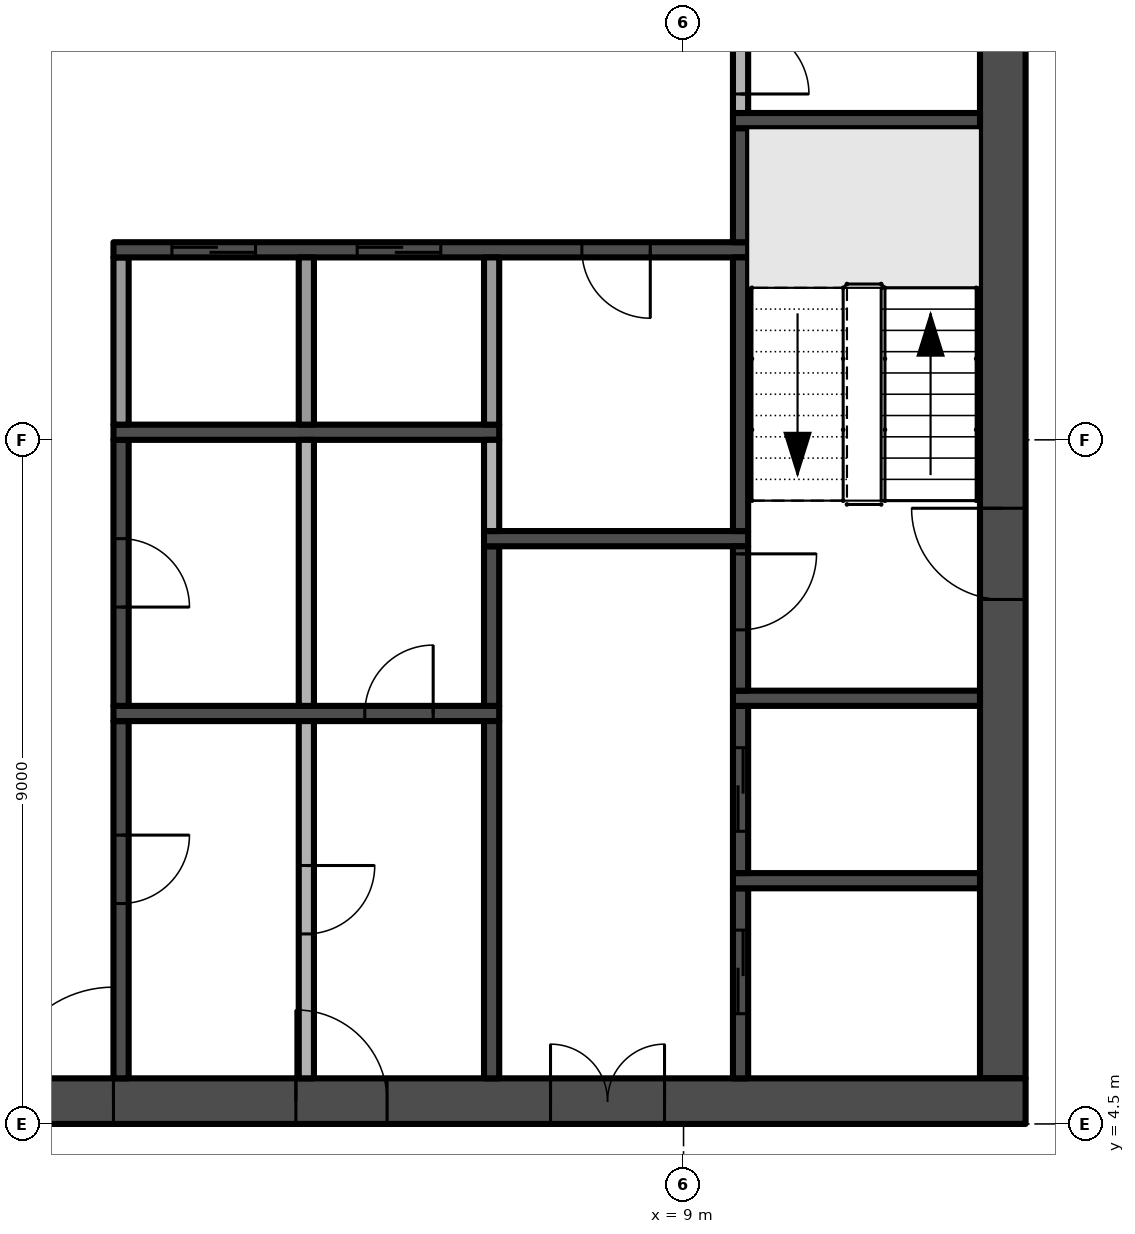
"""IFC4 building model, lengths in metres.
Left out: names, types, materials, properties, quantities, classifications, styles, units other than length and angle.
Written with IfcOpenShell. Run it as: python <this file> out.ifc"""

import sys

from ifc_helpers import new_model, si_unit, direction, frame, frame_2d, origin, place, context, subcontext, project, spatial, rectangle, extrude, element, fill, save


model = new_model("IFC4")
c1 = context("Model", 3, precision=1e-05, world=origin(), true_north=direction((0.0, 1.0)))
c2 = subcontext(c1, "Body", "Model", "MODEL_VIEW")
j1 = project(units=[si_unit("LENGTHUNIT", "METRE"), si_unit("PLANEANGLEUNIT", "RADIAN")], contexts=[c1])
p1 = place(None, origin())
s1 = spatial("IfcSite", under=j1, at=p1, CompositionType="ELEMENT")
p2 = place(p1, origin())
s2 = spatial("IfcBuilding", under=s1, at=p2, CompositionType="ELEMENT")
p3 = place(p2, frame((0.0, 0.0, 254.0)))
s3 = spatial("IfcBuildingStorey", under=s2, at=p3, CompositionType="ELEMENT", Elevation=254.0)
p4 = place(p3, frame((-13.5, 4.8, -0.3), z_axis=(0.0, 0.0, 1.0), x_axis=(1.0, 0.0, 0.0)))
e1 = element("IfcWall", 1, at=p4, inside=s3, PredefinedType="SHEAR", context=c2, shape_type="SweptSolid", body=[
    extrude(rectangle(XDim=27.0, YDim=0.6, at=frame_2d((13.5, 0.0))), origin(), (0.0, 0.0, 1.0), 3.8),
])
p5 = place(p4, frame((12.0, 0.0, 0.3)))
e2 = element("IfcOpeningElement", 2, at=p5, cuts=e1, PredefinedType="OPENING", context=c2, shape_type="SweptSolid", body=[
    extrude(rectangle(XDim=3.0, YDim=2.4, at=frame_2d((1.5, 1.2))), frame((0.0, 0.31, 0.0), z_axis=(0.0, -1.0, 0.0), x_axis=(1.0, 0.0, 0.0)), (0.0, 0.0, 1.0), 0.62),
])
p6 = place(p4, frame((4.9, 0.0, 0.3)))
e3 = element("IfcOpeningElement", 3, at=p6, cuts=e1, PredefinedType="OPENING", context=c2, shape_type="SweptSolid", body=[
    extrude(rectangle(XDim=1.2, YDim=2.2, at=frame_2d((0.6, 1.1))), frame((0.0, 0.31, 0.0), z_axis=(0.0, -1.0, 0.0), x_axis=(1.0, 0.0, 0.0)), (0.0, 0.0, 1.0), 0.62),
])
p7 = place(p4, frame((20.75, 0.0, 0.3)))
e4 = element("IfcOpeningElement", 4, at=p7, cuts=e1, PredefinedType="OPENING", context=c2, shape_type="SweptSolid", body=[
    extrude(rectangle(XDim=1.5, YDim=2.2, at=frame_2d((0.75, 1.1))), frame((0.0, 0.31, 0.0), z_axis=(0.0, -1.0, 0.0), x_axis=(1.0, 0.0, 0.0)), (0.0, 0.0, 1.0), 0.62),
])
p8 = place(p4, frame((17.4, 0.0, 0.3)))
e5 = element("IfcOpeningElement", 5, at=p8, cuts=e1, PredefinedType="OPENING", context=c2, shape_type="SweptSolid", body=[
    extrude(rectangle(XDim=1.2, YDim=2.2, at=frame_2d((0.6, 1.1))), frame((0.0, 0.31, 0.0), z_axis=(0.0, -1.0, 0.0), x_axis=(1.0, 0.0, 0.0)), (0.0, 0.0, 1.0), 0.62),
])
p9 = place(p3, frame((13.2, 5.1, -0.3), z_axis=(0.0, 0.0, 1.0), x_axis=(0.0, 1.0, 0.0)))
e6 = element("IfcWall", 6, at=p9, inside=s3, PredefinedType="SHEAR", context=c2, shape_type="SweptSolid", body=[
    extrude(rectangle(XDim=16.8, YDim=0.6, at=frame_2d((8.4, 0.0))), origin(), (0.0, 0.0, 1.0), 3.8),
])
p10 = place(p9, frame((6.3, 0.0, 0.3)))
e7 = element("IfcOpeningElement", 7, at=p10, cuts=e6, PredefinedType="OPENING", context=c2, shape_type="SweptSolid", body=[
    extrude(rectangle(XDim=1.2, YDim=2.2, at=frame_2d((0.6, 1.1))), frame((0.0, 0.31, 0.0), z_axis=(0.0, -1.0, 0.0), x_axis=(1.0, 0.0, 0.0)), (0.0, 0.0, 1.0), 0.62),
])
p11 = place(p3, frame((1.6, 9.8, 0.0), z_axis=(0.0, 0.0, 1.0), x_axis=(0.0, -1.0, 0.0)))
e8 = element("IfcWall", 8, at=p11, inside=s3, PredefinedType="SHEAR", context=c2, shape_type="SweptSolid", body=[
    extrude(rectangle(XDim=4.7, YDim=0.2, at=frame_2d((2.35, 0.0))), origin(), (0.0, 0.0, 1.0), 3.5),
])
p12 = place(p11, frame((1.5, 0.0, 0.0)))
e9 = element("IfcOpeningElement", 9, at=p12, cuts=e8, PredefinedType="OPENING", context=c2, shape_type="SweptSolid", body=[
    extrude(rectangle(XDim=0.9, YDim=2.1, at=frame_2d((0.45, 1.05))), frame((0.0, 0.11, 0.0), z_axis=(0.0, -1.0, 0.0), x_axis=(1.0, 0.0, 0.0)), (0.0, 0.0, 1.0), 0.22),
])
p13 = place(p3, frame((1.5, 9.9, 0.0), z_axis=(0.0, 0.0, 1.0), x_axis=(1.0, 0.0, 0.0)))
e10 = element("IfcWall", 10, at=p13, inside=s3, PredefinedType="SHEAR", context=c2, shape_type="SweptSolid", body=[
    extrude(rectangle(XDim=5.075, YDim=0.2, at=frame_2d((2.538, 0.0))), origin(), (0.0, 0.0, 1.0), 3.5),
])
p14 = place(p13, frame((3.306, 0.0, 0.0)))
e11 = element("IfcOpeningElement", 11, at=p14, cuts=e10, PredefinedType="OPENING", context=c2, shape_type="SweptSolid", body=[
    extrude(rectangle(XDim=0.9, YDim=2.1, at=frame_2d((0.45, 1.05))), frame((0.0, 0.11, 0.0), z_axis=(0.0, -1.0, 0.0), x_axis=(1.0, 0.0, 0.0)), (0.0, 0.0, 1.0), 0.22),
])
p15 = place(p3, frame((1.6, 13.5, 0.0), z_axis=(0.0, 0.0, 1.0), x_axis=(0.0, -1.0, 0.0)))
e12 = element("IfcWall", 12, at=p15, inside=s3, PredefinedType="SHEAR", context=c2, shape_type="SweptSolid", body=[
    extrude(rectangle(XDim=3.5, YDim=0.2, at=frame_2d((1.75, 0.0))), origin(), (0.0, 0.0, 1.0), 3.5),
])
p16 = place(p15, frame((1.3, 0.0, 0.0)))
e13 = element("IfcOpeningElement", 13, at=p16, cuts=e12, PredefinedType="OPENING", context=c2, shape_type="SweptSolid", body=[
    extrude(rectangle(XDim=0.9, YDim=2.1, at=frame_2d((0.45, 1.05))), frame((0.0, 0.11, 0.0), z_axis=(0.0, -1.0, 0.0), x_axis=(1.0, 0.0, 0.0)), (0.0, 0.0, 1.0), 0.22),
])
p17 = place(p3, frame((1.5, 13.6, 0.0), z_axis=(0.0, 0.0, 1.0), x_axis=(1.0, 0.0, 0.0)))
e14 = element("IfcWall", 14, at=p17, inside=s3, PredefinedType="SHEAR", context=c2, shape_type="SweptSolid", body=[
    extrude(rectangle(XDim=5.075, YDim=0.2, at=frame_2d((2.538, 0.0))), origin(), (0.0, 0.0, 1.0), 3.5),
])
p18 = place(p3, frame((1.6, 13.7, 0.0), z_axis=(0.0, 0.0, 1.0), x_axis=(0.0, 1.0, 0.0)))
e15 = element("IfcWall", 15, at=p18, inside=s3, PredefinedType="PARTITIONING", context=c2, shape_type="SweptSolid", body=[
    extrude(rectangle(XDim=2.2, YDim=0.2, at=frame_2d((1.1, 0.0))), origin(), (0.0, 0.0, 1.0), 3.5),
])
p19 = place(p3, frame((9.85, 16.0, 0.0), z_axis=(0.0, 0.0, 1.0), x_axis=(-1.0, 0.0, 0.0)))
e16 = element("IfcWall", 16, at=p19, inside=s3, PredefinedType="SHEAR", context=c2, shape_type="SweptSolid", body=[
    extrude(rectangle(XDim=8.35, YDim=0.2, at=frame_2d((4.175, 0.0))), origin(), (0.0, 0.0, 1.0), 3.5),
])
p20 = place(p19, frame((6.481, 0.0, 0.0)))
e17 = element("IfcOpeningElement", 17, at=p20, cuts=e16, PredefinedType="OPENING", context=c2, shape_type="SweptSolid", body=[
    extrude(rectangle(XDim=1.1, YDim=2.1, at=frame_2d((0.55, 1.05))), frame((0.0, 0.11, 0.0), z_axis=(0.0, -1.0, 0.0), x_axis=(1.0, 0.0, 0.0)), (0.0, 0.0, 1.0), 0.22),
])
p21 = place(p19, frame((4.044, 0.0, 0.0)))
e18 = element("IfcOpeningElement", 18, at=p21, cuts=e16, PredefinedType="OPENING", context=c2, shape_type="SweptSolid", body=[
    extrude(rectangle(XDim=1.1, YDim=2.1, at=frame_2d((0.55, 1.05))), frame((0.0, 0.11, 0.0), z_axis=(0.0, -1.0, 0.0), x_axis=(1.0, 0.0, 0.0)), (0.0, 0.0, 1.0), 0.22),
])
p22 = place(p19, frame((1.288, 0.0, 0.0)))
e19 = element("IfcOpeningElement", 19, at=p22, cuts=e16, PredefinedType="OPENING", context=c2, shape_type="SweptSolid", body=[
    extrude(rectangle(XDim=0.9, YDim=2.1, at=frame_2d((0.45, 1.05))), frame((0.0, 0.11, 0.0), z_axis=(0.0, -1.0, 0.0), x_axis=(1.0, 0.0, 0.0)), (0.0, 0.0, 1.0), 0.22),
])
p23 = place(p3, frame((4.037, 9.8, 0.0), z_axis=(0.0, 0.0, 1.0), x_axis=(0.0, -1.0, 0.0)))
e20 = element("IfcWall", 20, at=p23, inside=s3, PredefinedType="PARTITIONING", context=c2, shape_type="SweptSolid", body=[
    extrude(rectangle(XDim=4.7, YDim=0.2, at=frame_2d((2.35, 0.0))), origin(), (0.0, 0.0, 1.0), 3.5),
])
p24 = place(p23, frame((1.9, 0.0, 0.0)))
e21 = element("IfcOpeningElement", 21, at=p24, cuts=e20, PredefinedType="OPENING", context=c2, shape_type="SweptSolid", body=[
    extrude(rectangle(XDim=0.9, YDim=2.1, at=frame_2d((0.45, 1.05))), frame((0.0, 0.11, 0.0), z_axis=(0.0, -1.0, 0.0), x_axis=(1.0, 0.0, 0.0)), (0.0, 0.0, 1.0), 0.22),
])
p25 = place(p3, frame((4.037, 10.0, 0.0), z_axis=(0.0, 0.0, 1.0), x_axis=(0.0, 1.0, 0.0)))
e22 = element("IfcWall", 22, at=p25, inside=s3, PredefinedType="PARTITIONING", context=c2, shape_type="SweptSolid", body=[
    extrude(rectangle(XDim=3.5, YDim=0.2, at=frame_2d((1.75, 0.0))), origin(), (0.0, 0.0, 1.0), 3.5),
])
p26 = place(p3, frame((4.037, 13.7, 0.0), z_axis=(0.0, 0.0, 1.0), x_axis=(0.0, 1.0, 0.0)))
e23 = element("IfcWall", 23, at=p26, inside=s3, PredefinedType="PARTITIONING", context=c2, shape_type="SweptSolid", body=[
    extrude(rectangle(XDim=2.2, YDim=0.2, at=frame_2d((1.1, 0.0))), origin(), (0.0, 0.0, 1.0), 3.5),
])
p27 = place(p3, frame((6.475, 5.1, 0.0), z_axis=(0.0, 0.0, 1.0), x_axis=(0.0, 1.0, 0.0)))
e24 = element("IfcWall", 24, at=p27, inside=s3, PredefinedType="SHEAR", context=c2, shape_type="SweptSolid", body=[
    extrude(rectangle(XDim=4.7, YDim=0.2, at=frame_2d((2.35, 0.0))), origin(), (0.0, 0.0, 1.0), 3.5),
])
p28 = place(p3, frame((6.475, 10.0, 0.0), z_axis=(0.0, 0.0, 1.0), x_axis=(0.0, 1.0, 0.0)))
e25 = element("IfcWall", 25, at=p28, inside=s3, PredefinedType="SHEAR", context=c2, shape_type="SweptSolid", body=[
    extrude(rectangle(XDim=2.1, YDim=0.2, at=frame_2d((1.05, 0.0))), origin(), (0.0, 0.0, 1.0), 3.5),
])
p29 = place(p3, frame((6.375, 12.2, 0.0), z_axis=(0.0, 0.0, 1.0), x_axis=(1.0, 0.0, 0.0)))
e26 = element("IfcWall", 26, at=p29, inside=s3, PredefinedType="SHEAR", context=c2, shape_type="SweptSolid", body=[
    extrude(rectangle(XDim=3.475, YDim=0.2, at=frame_2d((1.738, 0.0))), origin(), (0.0, 0.0, 1.0), 3.5),
])
p30 = place(p3, frame((6.475, 12.3, 0.0), z_axis=(0.0, 0.0, 1.0), x_axis=(0.0, 1.0, 0.0)))
e27 = element("IfcWall", 27, at=p30, inside=s3, PredefinedType="PARTITIONING", context=c2, shape_type="SweptSolid", body=[
    extrude(rectangle(XDim=1.2, YDim=0.2, at=frame_2d((0.6, 0.0))), origin(), (0.0, 0.0, 1.0), 3.5),
])
p31 = place(p3, frame((6.475, 13.7, 0.0), z_axis=(0.0, 0.0, 1.0), x_axis=(0.0, 1.0, 0.0)))
e28 = element("IfcWall", 28, at=p31, inside=s3, PredefinedType="PARTITIONING", context=c2, shape_type="SweptSolid", body=[
    extrude(rectangle(XDim=2.2, YDim=0.2, at=frame_2d((1.1, 0.0))), origin(), (0.0, 0.0, 1.0), 3.5),
])
p32 = place(p3, frame((9.75, 5.1, 0.0), z_axis=(0.0, 0.0, 1.0), x_axis=(0.0, 1.0, 0.0)))
e29 = element("IfcWall", 29, at=p32, inside=s3, PredefinedType="SHEAR", context=c2, shape_type="SweptSolid", body=[
    extrude(rectangle(XDim=2.5, YDim=0.2, at=frame_2d((1.25, 0.0))), origin(), (0.0, 0.0, 1.0), 3.5),
])
p33 = place(p32, frame((0.85, 0.0, 0.0)))
e30 = element("IfcOpeningElement", 30, at=p33, cuts=e29, PredefinedType="OPENING", context=c2, shape_type="SweptSolid", body=[
    extrude(rectangle(XDim=1.1, YDim=2.1, at=frame_2d((0.55, 1.05))), frame((0.0, 0.11, 0.0), z_axis=(0.0, -1.0, 0.0), x_axis=(1.0, 0.0, 0.0)), (0.0, 0.0, 1.0), 0.22),
])
p34 = place(p3, frame((9.65, 7.7, 0.0), z_axis=(0.0, 0.0, 1.0), x_axis=(1.0, 0.0, 0.0)))
e31 = element("IfcWall", 31, at=p34, inside=s3, PredefinedType="SHEAR", context=c2, shape_type="SweptSolid", body=[
    extrude(rectangle(XDim=3.25, YDim=0.2, at=frame_2d((1.625, 0.0))), origin(), (0.0, 0.0, 1.0), 3.5),
])
p35 = place(p3, frame((9.75, 7.8, 0.0), z_axis=(0.0, 0.0, 1.0), x_axis=(0.0, 1.0, 0.0)))
e32 = element("IfcWall", 32, at=p35, inside=s3, PredefinedType="SHEAR", context=c2, shape_type="SweptSolid", body=[
    extrude(rectangle(XDim=2.2, YDim=0.2, at=frame_2d((1.1, 0.0))), origin(), (0.0, 0.0, 1.0), 3.5),
])
p36 = place(p35, frame((0.55, 0.0, 0.0)))
e33 = element("IfcOpeningElement", 33, at=p36, cuts=e32, PredefinedType="OPENING", context=c2, shape_type="SweptSolid", body=[
    extrude(rectangle(XDim=1.1, YDim=2.1, at=frame_2d((0.55, 1.05))), frame((0.0, 0.11, 0.0), z_axis=(0.0, -1.0, 0.0), x_axis=(1.0, 0.0, 0.0)), (0.0, 0.0, 1.0), 0.22),
])
p37 = place(p3, frame((9.65, 10.1, 0.0), z_axis=(0.0, 0.0, 1.0), x_axis=(1.0, 0.0, 0.0)))
e34 = element("IfcWall", 34, at=p37, inside=s3, PredefinedType="SHEAR", context=c2, shape_type="SweptSolid", body=[
    extrude(rectangle(XDim=3.25, YDim=0.2, at=frame_2d((1.625, 0.0))), origin(), (0.0, 0.0, 1.0), 3.5),
])
p38 = place(p3, frame((9.75, 12.1, 0.0), z_axis=(0.0, 0.0, 1.0), x_axis=(0.0, -1.0, 0.0)))
e35 = element("IfcWall", 35, at=p38, inside=s3, PredefinedType="SHEAR", context=c2, shape_type="SweptSolid", body=[
    extrude(rectangle(XDim=1.9, YDim=0.2, at=frame_2d((0.95, 0.0))), origin(), (0.0, 0.0, 1.0), 3.5),
])
p39 = place(p38, frame((0.1, 0.0, 0.0)))
e36 = element("IfcOpeningElement", 36, at=p39, cuts=e35, PredefinedType="OPENING", context=c2, shape_type="SweptSolid", body=[
    extrude(rectangle(XDim=1.0, YDim=2.2, at=frame_2d((0.5, 1.1))), frame((0.0, 0.11, 0.0), z_axis=(0.0, -1.0, 0.0), x_axis=(1.0, 0.0, 0.0)), (0.0, 0.0, 1.0), 0.22),
])
p40 = place(p3, frame((9.75, 12.3, 0.0), z_axis=(0.0, 0.0, 1.0), x_axis=(0.0, 1.0, 0.0)))
e37 = element("IfcWall", 37, at=p40, inside=s3, PredefinedType="SHEAR", context=c2, shape_type="SweptSolid", body=[
    extrude(rectangle(XDim=3.6, YDim=0.2, at=frame_2d((1.8, 0.0))), origin(), (0.0, 0.0, 1.0), 3.5),
])
p41 = place(p3, frame((9.75, 16.1, 0.0), z_axis=(0.0, 0.0, 1.0), x_axis=(0.0, 1.0, 0.0)))
e38 = element("IfcWall", 38, at=p41, inside=s3, PredefinedType="SHEAR", context=c2, shape_type="SweptSolid", body=[
    extrude(rectangle(XDim=1.5, YDim=0.2, at=frame_2d((0.75, 0.0))), origin(), (0.0, 0.0, 1.0), 3.5),
])
p42 = place(p3, frame((9.65, 17.7, 0.0), z_axis=(0.0, 0.0, 1.0), x_axis=(1.0, 0.0, 0.0)))
e39 = element("IfcWall", 39, at=p42, inside=s3, PredefinedType="SHEAR", context=c2, shape_type="SweptSolid", body=[
    extrude(rectangle(XDim=3.25, YDim=0.2, at=frame_2d((1.625, 0.0))), origin(), (0.0, 0.0, 1.0), 3.5),
])
p43 = place(p3, frame((9.75, 19.2, 0.0), z_axis=(0.0, 0.0, 1.0), x_axis=(0.0, -1.0, 0.0)))
e40 = element("IfcWall", 40, at=p43, inside=s3, PredefinedType="PARTITIONING", context=c2, shape_type="SweptSolid", body=[
    extrude(rectangle(XDim=1.4, YDim=0.2, at=frame_2d((0.7, 0.0))), origin(), (0.0, 0.0, 1.0), 3.5),
])
p44 = place(p43, frame((0.25, 0.0, 0.0)))
e41 = element("IfcOpeningElement", 41, at=p44, cuts=e40, PredefinedType="OPENING", context=c2, shape_type="SweptSolid", body=[
    extrude(rectangle(XDim=0.9, YDim=2.1, at=frame_2d((0.45, 1.05))), frame((0.0, 0.11, 0.0), z_axis=(0.0, -1.0, 0.0), x_axis=(1.0, 0.0, 0.0)), (0.0, 0.0, 1.0), 0.22),
])
p45 = place(p5, frame((3.0, 0.0, 0.0), z_axis=(0.0, 0.0, 1.0), x_axis=(-1.0, 0.0, 0.0)))
e42 = element("IfcDoor", 42, at=p45, inside=s3, OperationType="DOUBLE_DOOR_SINGLE_SWING", PredefinedType="DOOR", context=c2, shape_type="SweptSolid", body=[
    extrude(rectangle(XDim=3.0, YDim=2.4, at=frame_2d((1.5, 1.2))), frame((0.0, 0.025, 0.0), z_axis=(0.0, -1.0, 0.0), x_axis=(1.0, 0.0, 0.0)), (0.0, 0.0, 1.0), 0.05),
])
fill(e2, e42)
p46 = place(p10, frame((1.2, 0.0, 0.0), z_axis=(0.0, 0.0, 1.0), x_axis=(-1.0, 0.0, 0.0)))
e43 = element("IfcDoor", 43, at=p46, inside=s3, OperationType="SINGLE_SWING_LEFT", PredefinedType="DOOR", context=c2, shape_type="SweptSolid", body=[
    extrude(rectangle(XDim=1.2, YDim=2.2, at=frame_2d((0.6, 1.1))), frame((0.0, 0.025, 0.0), z_axis=(0.0, -1.0, 0.0), x_axis=(1.0, 0.0, 0.0)), (0.0, 0.0, 1.0), 0.05),
])
fill(e7, e43)
p47 = place(p7, frame((1.5, 0.0, 0.0), z_axis=(0.0, 0.0, 1.0), x_axis=(-1.0, 0.0, 0.0)))
e44 = element("IfcDoor", 44, at=p47, inside=s3, OperationType="DOUBLE_DOOR_SINGLE_SWING", PredefinedType="DOOR", context=c2, shape_type="SweptSolid", body=[
    extrude(rectangle(XDim=1.5, YDim=2.2, at=frame_2d((0.75, 1.1))), frame((0.0, 0.025, 0.0), z_axis=(0.0, -1.0, 0.0), x_axis=(1.0, 0.0, 0.0)), (0.0, 0.0, 1.0), 0.05),
])
fill(e4, e44)
p48 = place(p8, frame((1.2, 0.0, 0.0), z_axis=(0.0, 0.0, 1.0), x_axis=(-1.0, 0.0, 0.0)))
e45 = element("IfcDoor", 45, at=p48, inside=s3, OperationType="SINGLE_SWING_RIGHT", PredefinedType="DOOR", context=c2, shape_type="SweptSolid", body=[
    extrude(rectangle(XDim=1.2, YDim=2.2, at=frame_2d((0.6, 1.1))), frame((0.0, 0.025, 0.0), z_axis=(0.0, -1.0, 0.0), x_axis=(1.0, 0.0, 0.0)), (0.0, 0.0, 1.0), 0.05),
])
fill(e5, e45)
p49 = place(p39, origin())
e46 = element("IfcDoor", 46, at=p49, inside=s3, OperationType="SINGLE_SWING_LEFT", PredefinedType="DOOR", context=c2, shape_type="SweptSolid", body=[
    extrude(rectangle(XDim=1.0, YDim=2.2, at=frame_2d((0.5, 1.1))), frame((0.0, 0.025, 0.0), z_axis=(0.0, -1.0, 0.0), x_axis=(1.0, 0.0, 0.0)), (0.0, 0.0, 1.0), 0.05),
])
fill(e36, e46)
p50 = place(p20, origin())
e47 = element("IfcDoor", 47, at=p50, inside=s3, OperationType="SLIDING_TO_RIGHT", PredefinedType="DOOR", context=c2, shape_type="SweptSolid", body=[
    extrude(rectangle(XDim=1.1, YDim=2.1, at=frame_2d((0.55, 1.05))), frame((0.0, 0.025, 0.0), z_axis=(0.0, -1.0, 0.0), x_axis=(1.0, 0.0, 0.0)), (0.0, 0.0, 1.0), 0.05),
])
fill(e17, e47)
p51 = place(p21, origin())
e48 = element("IfcDoor", 48, at=p51, inside=s3, OperationType="SLIDING_TO_RIGHT", PredefinedType="DOOR", context=c2, shape_type="SweptSolid", body=[
    extrude(rectangle(XDim=1.1, YDim=2.1, at=frame_2d((0.55, 1.05))), frame((0.0, 0.025, 0.0), z_axis=(0.0, -1.0, 0.0), x_axis=(1.0, 0.0, 0.0)), (0.0, 0.0, 1.0), 0.05),
])
fill(e18, e48)
p52 = place(p33, origin())
e49 = element("IfcDoor", 49, at=p52, inside=s3, OperationType="SLIDING_TO_RIGHT", PredefinedType="DOOR", context=c2, shape_type="SweptSolid", body=[
    extrude(rectangle(XDim=1.1, YDim=2.1, at=frame_2d((0.55, 1.05))), frame((0.0, 0.025, 0.0), z_axis=(0.0, -1.0, 0.0), x_axis=(1.0, 0.0, 0.0)), (0.0, 0.0, 1.0), 0.05),
])
fill(e30, e49)
p53 = place(p36, origin())
e50 = element("IfcDoor", 50, at=p53, inside=s3, OperationType="SLIDING_TO_RIGHT", PredefinedType="DOOR", context=c2, shape_type="SweptSolid", body=[
    extrude(rectangle(XDim=1.1, YDim=2.1, at=frame_2d((0.55, 1.05))), frame((0.0, 0.025, 0.0), z_axis=(0.0, -1.0, 0.0), x_axis=(1.0, 0.0, 0.0)), (0.0, 0.0, 1.0), 0.05),
])
fill(e33, e50)
p54 = place(p12, origin())
e51 = element("IfcDoor", 51, at=p54, inside=s3, OperationType="SINGLE_SWING_LEFT", PredefinedType="DOOR", context=c2, shape_type="SweptSolid", body=[
    extrude(rectangle(XDim=0.9, YDim=2.1, at=frame_2d((0.45, 1.05))), frame((0.0, 0.025, 0.0), z_axis=(0.0, -1.0, 0.0), x_axis=(1.0, 0.0, 0.0)), (0.0, 0.0, 1.0), 0.05),
])
fill(e9, e51)
p55 = place(p24, origin())
e52 = element("IfcDoor", 52, at=p55, inside=s3, OperationType="SINGLE_SWING_LEFT", PredefinedType="DOOR", context=c2, shape_type="SweptSolid", body=[
    extrude(rectangle(XDim=0.9, YDim=2.1, at=frame_2d((0.45, 1.05))), frame((0.0, 0.025, 0.0), z_axis=(0.0, -1.0, 0.0), x_axis=(1.0, 0.0, 0.0)), (0.0, 0.0, 1.0), 0.05),
])
fill(e21, e52)
p56 = place(p16, origin())
e53 = element("IfcDoor", 53, at=p56, inside=s3, OperationType="SINGLE_SWING_RIGHT", PredefinedType="DOOR", context=c2, shape_type="SweptSolid", body=[
    extrude(rectangle(XDim=0.9, YDim=2.1, at=frame_2d((0.45, 1.05))), frame((0.0, 0.025, 0.0), z_axis=(0.0, -1.0, 0.0), x_axis=(1.0, 0.0, 0.0)), (0.0, 0.0, 1.0), 0.05),
])
fill(e13, e53)
p57 = place(p14, origin())
e54 = element("IfcDoor", 54, at=p57, inside=s3, OperationType="SINGLE_SWING_RIGHT", PredefinedType="DOOR", context=c2, shape_type="SweptSolid", body=[
    extrude(rectangle(XDim=0.9, YDim=2.1, at=frame_2d((0.45, 1.05))), frame((0.0, 0.025, 0.0), z_axis=(0.0, -1.0, 0.0), x_axis=(1.0, 0.0, 0.0)), (0.0, 0.0, 1.0), 0.05),
])
fill(e11, e54)
p58 = place(p22, origin())
e55 = element("IfcDoor", 55, at=p58, inside=s3, OperationType="SINGLE_SWING_LEFT", PredefinedType="DOOR", context=c2, shape_type="SweptSolid", body=[
    extrude(rectangle(XDim=0.9, YDim=2.1, at=frame_2d((0.45, 1.05))), frame((0.0, 0.025, 0.0), z_axis=(0.0, -1.0, 0.0), x_axis=(1.0, 0.0, 0.0)), (0.0, 0.0, 1.0), 0.05),
])
fill(e19, e55)
p59 = place(p44, origin())
e56 = element("IfcDoor", 56, at=p59, inside=s3, OperationType="SINGLE_SWING_RIGHT", PredefinedType="DOOR", context=c2, shape_type="SweptSolid", body=[
    extrude(rectangle(XDim=0.9, YDim=2.1, at=frame_2d((0.45, 1.05))), frame((0.0, 0.025, 0.0), z_axis=(0.0, -1.0, 0.0), x_axis=(1.0, 0.0, 0.0)), (0.0, 0.0, 1.0), 0.05),
])
fill(e41, e56)
save(model, sys.argv[1])
